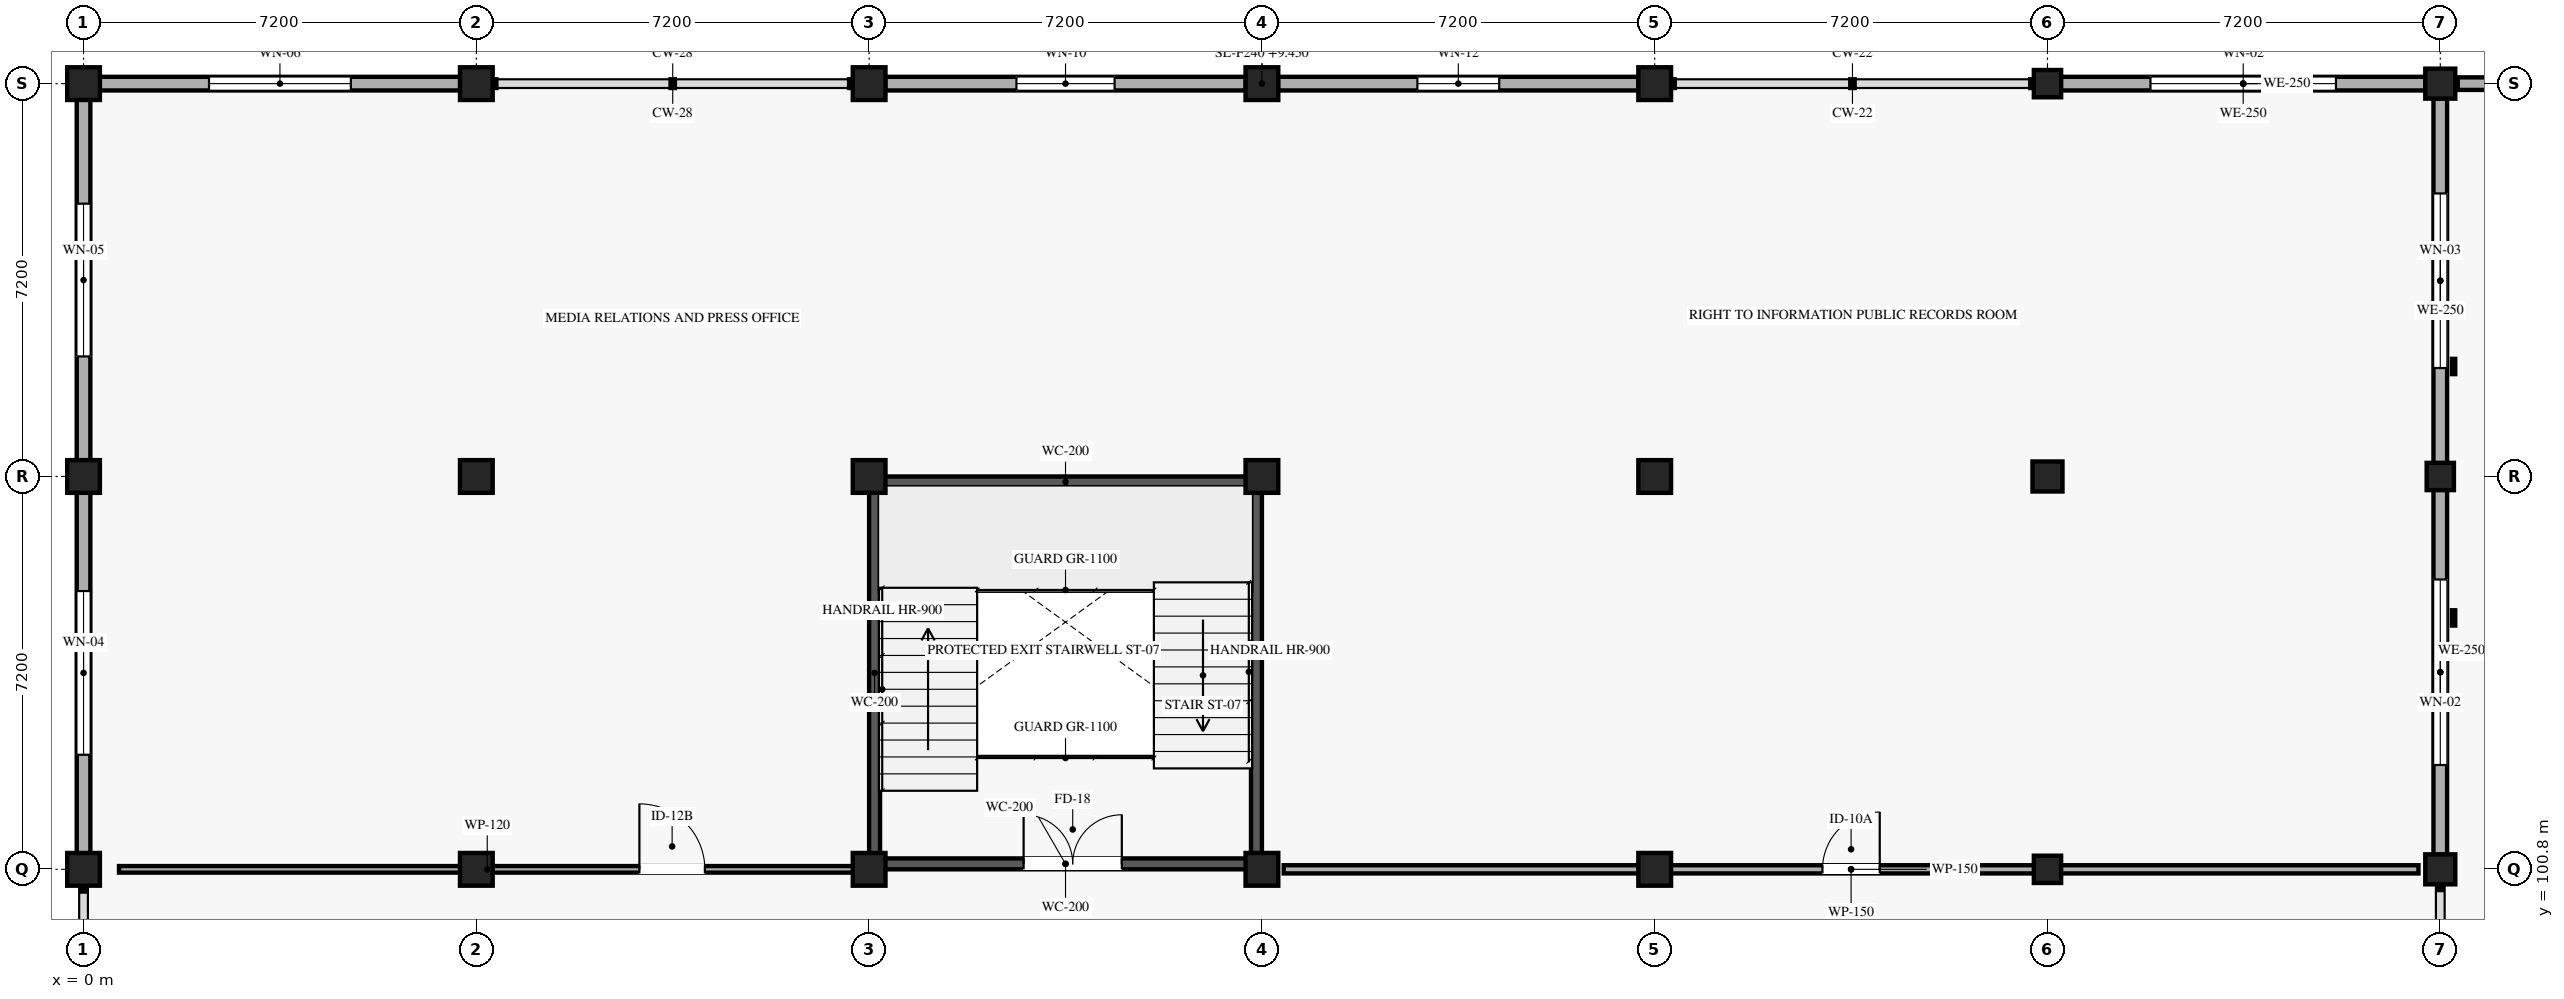
"""IFC4 building model, lengths in metres.
Left out: names, types, materials, properties, quantities, classifications, styles, units other than length and angle.
Written with IfcOpenShell. Run it as: python <this file> out.ifc"""

import sys

from ifc_helpers import new_model, si_unit, direction, frame, frame_2d, origin, origin_2d, place, context, subcontext, project, spatial, rectangle, extrude, element, fill, save


model = new_model("IFC4")
c1 = context("Model", 3, precision=1e-05, world=origin(), true_north=direction((0.0, 1.0)))
c2 = subcontext(c1, "Body", "Model", "MODEL_VIEW")
j1 = project(units=[si_unit("LENGTHUNIT", "METRE"), si_unit("PLANEANGLEUNIT", "RADIAN")], contexts=[c1])
p1 = place(None, origin())
s1 = spatial("IfcSite", under=j1, at=p1, CompositionType="ELEMENT")
p2 = place(p1, origin())
s2 = spatial("IfcBuilding", under=s1, at=p2, CompositionType="ELEMENT")
p3 = place(p2, frame((0.0, 0.0, 9.45)))
s3 = spatial("IfcBuildingStorey", under=s2, at=p3, CompositionType="ELEMENT", Elevation=9.45)
for number, where, z_axis, x_axis in (
    (1, (0.0, 100.8, 0.0), (0.0, 0.0, 1.0), (1.0, 0.0, 0.0)),
    (2, (0.0, 108.0, 0.0), (0.0, 0.0, 1.0), (1.0, 0.0, 0.0)),
    (3, (0.0, 115.2, 0.0), (0.0, 0.0, 1.0), (1.0, 0.0, 0.0)),
    (4, (7.2, 100.8, 0.0), (0.0, 0.0, 1.0), (1.0, 0.0, 0.0)),
    (5, (7.2, 108.0, 0.0), (0.0, 0.0, 1.0), (1.0, 0.0, 0.0)),
    (6, (7.2, 115.2, 0.0), (0.0, 0.0, 1.0), (1.0, 0.0, 0.0)),
    (7, (14.4, 100.8, 0.0), (0.0, 0.0, 1.0), (1.0, 0.0, 0.0)),
    (8, (14.4, 108.0, 0.0), (0.0, 0.0, 1.0), (1.0, 0.0, 0.0)),
    (9, (14.4, 115.2, 0.0), (0.0, 0.0, 1.0), (1.0, 0.0, 0.0)),
    (10, (21.6, 100.8, 0.0), (0.0, 0.0, 1.0), (1.0, 0.0, 0.0)),
    (11, (21.6, 108.0, 0.0), (0.0, 0.0, 1.0), (1.0, 0.0, 0.0)),
    (12, (21.6, 115.2, 0.0), (0.0, 0.0, 1.0), (1.0, 0.0, 0.0)),
    (13, (28.8, 100.8, 0.0), (0.0, 0.0, 1.0), (1.0, 0.0, 0.0)),
    (14, (28.8, 108.0, 0.0), (0.0, 0.0, 1.0), (1.0, 0.0, 0.0)),
    (15, (28.8, 115.2, 0.0), (0.0, 0.0, 1.0), (1.0, 0.0, 0.0)),
):
    element("IfcColumn", number, at=place(p3, frame(where, z_axis=z_axis, x_axis=x_axis)), inside=s3, PredefinedType="COLUMN", context=c2, shape_type="SweptSolid", body=[
        extrude(rectangle(XDim=0.6, YDim=0.6, at=origin_2d()), origin(), (0.0, 0.0, 1.0), 4.05),
    ])
p4 = place(p3, frame((36.0, 100.8, 0.0), z_axis=(0.0, 0.0, 1.0), x_axis=(1.0, 0.0, 0.0)))
e16 = element("IfcColumn", 16, at=p4, inside=s3, PredefinedType="COLUMN", context=c2, shape_type="SweptSolid", body=[
    extrude(rectangle(XDim=0.5, YDim=0.5, at=origin_2d()), origin(), (0.0, 0.0, 1.0), 4.05),
])
p5 = place(p3, frame((36.0, 108.0, 0.0), z_axis=(0.0, 0.0, 1.0), x_axis=(1.0, 0.0, 0.0)))
e17 = element("IfcColumn", 17, at=p5, inside=s3, PredefinedType="COLUMN", context=c2, shape_type="SweptSolid", body=[
    extrude(rectangle(XDim=0.55, YDim=0.55, at=origin_2d()), origin(), (0.0, 0.0, 1.0), 4.05),
])
p6 = place(p3, frame((36.0, 115.2, 0.0), z_axis=(0.0, 0.0, 1.0), x_axis=(1.0, 0.0, 0.0)))
e18 = element("IfcColumn", 18, at=p6, inside=s3, PredefinedType="COLUMN", context=c2, shape_type="SweptSolid", body=[
    extrude(rectangle(XDim=0.5, YDim=0.5, at=origin_2d()), origin(), (0.0, 0.0, 1.0), 4.05),
])
p7 = place(p3, frame((43.2, 100.8, 0.0), z_axis=(0.0, 0.0, 1.0), x_axis=(1.0, 0.0, 0.0)))
e19 = element("IfcColumn", 19, at=p7, inside=s3, PredefinedType="COLUMN", context=c2, shape_type="SweptSolid", body=[
    extrude(rectangle(XDim=0.55, YDim=0.55, at=origin_2d()), origin(), (0.0, 0.0, 1.0), 4.05),
])
p8 = place(p3, frame((43.2, 108.0, 0.0), z_axis=(0.0, 0.0, 1.0), x_axis=(1.0, 0.0, 0.0)))
e20 = element("IfcColumn", 20, at=p8, inside=s3, PredefinedType="COLUMN", context=c2, shape_type="SweptSolid", body=[
    extrude(rectangle(XDim=0.5, YDim=0.5, at=origin_2d()), origin(), (0.0, 0.0, 1.0), 4.05),
])
p9 = place(p3, frame((43.2, 115.2, 0.0), z_axis=(0.0, 0.0, 1.0), x_axis=(1.0, 0.0, 0.0)))
e21 = element("IfcColumn", 21, at=p9, inside=s3, PredefinedType="COLUMN", context=c2, shape_type="SweptSolid", body=[
    extrude(rectangle(XDim=0.55, YDim=0.55, at=origin_2d()), origin(), (0.0, 0.0, 1.0), 4.05),
])
p10 = place(p3, frame((0.295, 115.2, 0.0), z_axis=(0.0, 0.0, 1.0), x_axis=(1.0, 0.0, 0.0)))
e22 = element("IfcWall", 22, at=p10, inside=s3, PredefinedType="SOLIDWALL", context=c2, shape_type="SweptSolid", body=[
    extrude(rectangle(XDim=6.61, YDim=0.25, at=frame_2d((3.305, 0.0))), origin(), (0.0, 0.0, 1.0), 3.195),
])
p11 = place(p10, frame((2.005, 0.0, 0.85)))
e23 = element("IfcOpeningElement", 23, at=p11, cuts=e22, PredefinedType="OPENING", context=c2, shape_type="SweptSolid", body=[
    extrude(rectangle(XDim=2.6, YDim=1.8, at=frame_2d((1.3, 0.9))), frame((0.0, 0.135, 0.0), z_axis=(0.0, -1.0, 0.0), x_axis=(1.0, 0.0, 0.0)), (0.0, 0.0, 1.0), 0.27),
])
p12 = place(p3, frame((14.695, 115.2, 0.0), z_axis=(0.0, 0.0, 1.0), x_axis=(1.0, 0.0, 0.0)))
e24 = element("IfcWall", 24, at=p12, inside=s3, PredefinedType="SOLIDWALL", context=c2, shape_type="SweptSolid", body=[
    extrude(rectangle(XDim=6.61, YDim=0.25, at=frame_2d((3.305, 0.0))), origin(), (0.0, 0.0, 1.0), 3.195),
])
p13 = place(p12, frame((2.405, 0.0, 0.85)))
e25 = element("IfcOpeningElement", 25, at=p13, cuts=e24, PredefinedType="OPENING", context=c2, shape_type="SweptSolid", body=[
    extrude(rectangle(XDim=1.8, YDim=1.6, at=frame_2d((0.9, 0.8))), frame((0.0, 0.135, 0.0), z_axis=(0.0, -1.0, 0.0), x_axis=(1.0, 0.0, 0.0)), (0.0, 0.0, 1.0), 0.27),
])
p14 = place(p3, frame((21.895, 115.2, 0.0), z_axis=(0.0, 0.0, 1.0), x_axis=(1.0, 0.0, 0.0)))
e26 = element("IfcWall", 26, at=p14, inside=s3, PredefinedType="SOLIDWALL", context=c2, shape_type="SweptSolid", body=[
    extrude(rectangle(XDim=6.61, YDim=0.25, at=frame_2d((3.305, 0.0))), origin(), (0.0, 0.0, 1.0), 3.195),
])
p15 = place(p14, frame((2.555, 0.0, 0.85)))
e27 = element("IfcOpeningElement", 27, at=p15, cuts=e26, PredefinedType="OPENING", context=c2, shape_type="SweptSolid", body=[
    extrude(rectangle(XDim=1.5, YDim=2.05, at=frame_2d((0.75, 1.025))), frame((0.0, 0.135, 0.0), z_axis=(0.0, -1.0, 0.0), x_axis=(1.0, 0.0, 0.0)), (0.0, 0.0, 1.0), 0.27),
])
p16 = place(p3, frame((36.245, 115.2, 0.0), z_axis=(0.0, 0.0, 1.0), x_axis=(1.0, 0.0, 0.0)))
e28 = element("IfcWall", 28, at=p16, inside=s3, PredefinedType="SOLIDWALL", context=c2, shape_type="SweptSolid", body=[
    extrude(rectangle(XDim=6.685, YDim=0.25, at=frame_2d((3.342, 0.0))), origin(), (0.0, 0.0, 1.0), 3.195),
])
p17 = place(p16, frame((1.643, 0.0, 0.85)))
e29 = element("IfcOpeningElement", 29, at=p17, cuts=e28, PredefinedType="OPENING", context=c2, shape_type="SweptSolid", body=[
    extrude(rectangle(XDim=3.4, YDim=2.0, at=frame_2d((1.7, 1.0))), frame((0.0, 0.135, 0.0), z_axis=(0.0, -1.0, 0.0), x_axis=(1.0, 0.0, 0.0)), (0.0, 0.0, 1.0), 0.27),
])
p18 = place(p3, frame((0.0, 101.095, 0.0), z_axis=(0.0, 0.0, 1.0), x_axis=(0.0, 1.0, 0.0)))
e30 = element("IfcWall", 30, at=p18, inside=s3, PredefinedType="SOLIDWALL", context=c2, shape_type="SweptSolid", body=[
    extrude(rectangle(XDim=6.61, YDim=0.25, at=frame_2d((3.305, 0.0))), origin(), (0.0, 0.0, 1.0), 3.195),
])
p19 = place(p18, frame((1.805, 0.0, 0.85)))
e31 = element("IfcOpeningElement", 31, at=p19, cuts=e30, PredefinedType="OPENING", context=c2, shape_type="SweptSolid", body=[
    extrude(rectangle(XDim=3.0, YDim=1.9, at=frame_2d((1.5, 0.95))), frame((0.0, 0.135, 0.0), z_axis=(0.0, -1.0, 0.0), x_axis=(1.0, 0.0, 0.0)), (0.0, 0.0, 1.0), 0.27),
])
p20 = place(p3, frame((0.0, 108.295, 0.0), z_axis=(0.0, 0.0, 1.0), x_axis=(0.0, 1.0, 0.0)))
e32 = element("IfcWall", 32, at=p20, inside=s3, PredefinedType="SOLIDWALL", context=c2, shape_type="SweptSolid", body=[
    extrude(rectangle(XDim=6.61, YDim=0.25, at=frame_2d((3.305, 0.0))), origin(), (0.0, 0.0, 1.0), 3.195),
])
p21 = place(p20, frame((1.905, 0.0, 0.85)))
e33 = element("IfcOpeningElement", 33, at=p21, cuts=e32, PredefinedType="OPENING", context=c2, shape_type="SweptSolid", body=[
    extrude(rectangle(XDim=2.8, YDim=1.85, at=frame_2d((1.4, 0.925))), frame((0.0, 0.135, 0.0), z_axis=(0.0, -1.0, 0.0), x_axis=(1.0, 0.0, 0.0)), (0.0, 0.0, 1.0), 0.27),
])
p22 = place(p3, frame((43.2, 101.07, 0.0), z_axis=(0.0, 0.0, 1.0), x_axis=(0.0, 1.0, 0.0)))
e34 = element("IfcWall", 34, at=p22, inside=s3, PredefinedType="SOLIDWALL", context=c2, shape_type="SweptSolid", body=[
    extrude(rectangle(XDim=6.685, YDim=0.25, at=frame_2d((3.342, 0.0))), origin(), (0.0, 0.0, 1.0), 3.195),
])
p23 = place(p22, frame((1.643, 0.0, 0.85)))
e35 = element("IfcOpeningElement", 35, at=p23, cuts=e34, PredefinedType="OPENING", context=c2, shape_type="SweptSolid", body=[
    extrude(rectangle(XDim=3.4, YDim=2.0, at=frame_2d((1.7, 1.0))), frame((0.0, 0.135, 0.0), z_axis=(0.0, -1.0, 0.0), x_axis=(1.0, 0.0, 0.0)), (0.0, 0.0, 1.0), 0.27),
])
p24 = place(p3, frame((43.2, 108.245, 0.0), z_axis=(0.0, 0.0, 1.0), x_axis=(0.0, 1.0, 0.0)))
e36 = element("IfcWall", 36, at=p24, inside=s3, PredefinedType="SOLIDWALL", context=c2, shape_type="SweptSolid", body=[
    extrude(rectangle(XDim=6.685, YDim=0.25, at=frame_2d((3.342, 0.0))), origin(), (0.0, 0.0, 1.0), 3.195),
])
p25 = place(p24, frame((1.742, 0.0, 0.85)))
e37 = element("IfcOpeningElement", 37, at=p25, cuts=e36, PredefinedType="OPENING", context=c2, shape_type="SweptSolid", body=[
    extrude(rectangle(XDim=3.2, YDim=1.95, at=frame_2d((1.6, 0.975))), frame((0.0, 0.135, 0.0), z_axis=(0.0, -1.0, 0.0), x_axis=(1.0, 0.0, 0.0)), (0.0, 0.0, 1.0), 0.27),
])
p26 = place(p3, frame((43.52, 115.2, -0.24), z_axis=(0.0, 0.0, 1.0), x_axis=(1.0, 0.0, 0.0)))
e38 = element("IfcWall", 38, at=p26, inside=s3, PredefinedType="SOLIDWALL", context=c2, shape_type="SweptSolid", body=[
    extrude(rectangle(XDim=6.56, YDim=0.23, at=frame_2d((3.28, 0.0))), origin(), (0.0, 0.0, 1.0), 8.79),
])
p27 = place(p26, frame((1.18, 0.0, 0.85)))
e39 = element("IfcOpeningElement", 39, at=p27, cuts=e38, PredefinedType="OPENING", context=c2, shape_type="SweptSolid", body=[
    extrude(rectangle(XDim=4.2, YDim=1.75, at=frame_2d((2.1, 0.875))), frame((0.0, 0.125, 0.0), z_axis=(0.0, -1.0, 0.0), x_axis=(1.0, 0.0, 0.0)), (0.0, 0.0, 1.0), 0.25),
])
p28 = place(p3, frame((14.6, 100.9, 0.0), z_axis=(0.0, 0.0, 1.0), x_axis=(1.0, 0.0, 0.0)))
e40 = element("IfcWall", 40, at=p28, inside=s3, PredefinedType="SHEAR", context=c2, shape_type="SweptSolid", body=[
    extrude(rectangle(XDim=6.8, YDim=0.2, at=frame_2d((3.4, 0.0))), origin(), (0.0, 0.0, 1.0), 3.81),
])
p29 = place(p28, frame((2.632, 0.0, 0.0)))
e41 = element("IfcOpeningElement", 41, at=p29, cuts=e40, PredefinedType="OPENING", context=c2, shape_type="SweptSolid", body=[
    extrude(rectangle(XDim=1.8, YDim=2.2, at=frame_2d((0.9, 1.1))), frame((0.0, 0.11, 0.0), z_axis=(0.0, -1.0, 0.0), x_axis=(1.0, 0.0, 0.0)), (0.0, 0.0, 1.0), 0.22),
])
p30 = place(p3, frame((14.6, 107.9, 0.0), z_axis=(0.0, 0.0, 1.0), x_axis=(1.0, 0.0, 0.0)))
e42 = element("IfcWall", 42, at=p30, inside=s3, PredefinedType="SHEAR", context=c2, shape_type="SweptSolid", body=[
    extrude(rectangle(XDim=6.8, YDim=0.2, at=frame_2d((3.4, 0.0))), origin(), (0.0, 0.0, 1.0), 3.81),
])
for number, where, z_axis, x_axis in (
    (43, (14.5, 101.0, 0.0), (0.0, 0.0, 1.0), (0.0, 1.0, 0.0)),
    (44, (21.5, 101.0, 0.0), (0.0, 0.0, 1.0), (0.0, 1.0, 0.0)),
):
    element("IfcWall", number, at=place(p3, frame(where, z_axis=z_axis, x_axis=x_axis)), inside=s3, PredefinedType="SHEAR", context=c2, shape_type="SweptSolid", body=[
        extrude(rectangle(XDim=6.8, YDim=0.2, at=frame_2d((3.4, 0.0))), origin(), (0.0, 0.0, 1.0), 3.81),
    ])
p31 = place(p3, frame((0.65, 100.8, 0.0), z_axis=(0.0, 0.0, 1.0), x_axis=(1.0, 0.0, 0.0)))
e45 = element("IfcWall", 45, at=p31, inside=s3, PredefinedType="PARTITIONING", context=c2, shape_type="SweptSolid", body=[
    extrude(rectangle(XDim=13.5, YDim=0.12, at=frame_2d((6.75, 0.0))), origin(), (0.0, 0.0, 1.0), 3.2),
])
p32 = place(p31, frame((9.539, 0.0, 0.0)))
e46 = element("IfcOpeningElement", 46, at=p32, cuts=e45, PredefinedType="OPENING", context=c2, shape_type="SweptSolid", body=[
    extrude(rectangle(XDim=1.2, YDim=2.15, at=frame_2d((0.6, 1.075))), frame((0.0, 0.07, 0.0), z_axis=(0.0, -1.0, 0.0), x_axis=(1.0, 0.0, 0.0)), (0.0, 0.0, 1.0), 0.14),
])
p33 = place(p3, frame((22.0, 100.8, 0.0), z_axis=(0.0, 0.0, 1.0), x_axis=(1.0, 0.0, 0.0)))
e47 = element("IfcWall", 47, at=p33, inside=s3, PredefinedType="PARTITIONING", context=c2, shape_type="SweptSolid", body=[
    extrude(rectangle(XDim=20.8, YDim=0.15, at=frame_2d((10.4, 0.0))), origin(), (0.0, 0.0, 1.0), 3.2),
])
p34 = place(p33, frame((9.875, 0.0, 0.0)))
e48 = element("IfcOpeningElement", 48, at=p34, cuts=e47, PredefinedType="OPENING", context=c2, shape_type="SweptSolid", body=[
    extrude(rectangle(XDim=1.05, YDim=2.15, at=frame_2d((0.525, 1.075))), frame((0.0, 0.085, 0.0), z_axis=(0.0, -1.0, 0.0), x_axis=(1.0, 0.0, 0.0)), (0.0, 0.0, 1.0), 0.17),
])
p35 = place(p11, origin())
e49 = element("IfcWindow", 49, at=p35, inside=s3, PartitioningType="SINGLE_PANEL", PredefinedType="WINDOW", context=c2, shape_type="SweptSolid", body=[
    extrude(rectangle(XDim=2.6, YDim=1.8, at=frame_2d((1.3, 0.9))), frame((0.0, 0.03, 0.0), z_axis=(0.0, -1.0, 0.0), x_axis=(1.0, 0.0, 0.0)), (0.0, 0.0, 1.0), 0.06),
])
fill(e23, e49)
p36 = place(p13, origin())
e50 = element("IfcWindow", 50, at=p36, inside=s3, PartitioningType="SINGLE_PANEL", PredefinedType="WINDOW", context=c2, shape_type="SweptSolid", body=[
    extrude(rectangle(XDim=1.8, YDim=1.6, at=frame_2d((0.9, 0.8))), frame((0.0, 0.03, 0.0), z_axis=(0.0, -1.0, 0.0), x_axis=(1.0, 0.0, 0.0)), (0.0, 0.0, 1.0), 0.06),
])
fill(e25, e50)
p37 = place(p15, origin())
e51 = element("IfcWindow", 51, at=p37, inside=s3, PartitioningType="SINGLE_PANEL", PredefinedType="WINDOW", context=c2, shape_type="SweptSolid", body=[
    extrude(rectangle(XDim=1.5, YDim=2.05, at=frame_2d((0.75, 1.025))), frame((0.0, 0.03, 0.0), z_axis=(0.0, -1.0, 0.0), x_axis=(1.0, 0.0, 0.0)), (0.0, 0.0, 1.0), 0.06),
])
fill(e27, e51)
p38 = place(p17, origin())
e52 = element("IfcWindow", 52, at=p38, inside=s3, PartitioningType="SINGLE_PANEL", PredefinedType="WINDOW", context=c2, shape_type="SweptSolid", body=[
    extrude(rectangle(XDim=3.4, YDim=2.0, at=frame_2d((1.7, 1.0))), frame((0.0, 0.03, 0.0), z_axis=(0.0, -1.0, 0.0), x_axis=(1.0, 0.0, 0.0)), (0.0, 0.0, 1.0), 0.06),
])
fill(e29, e52)
p39 = place(p19, origin())
e53 = element("IfcWindow", 53, at=p39, inside=s3, PartitioningType="SINGLE_PANEL", PredefinedType="WINDOW", context=c2, shape_type="SweptSolid", body=[
    extrude(rectangle(XDim=3.0, YDim=1.9, at=frame_2d((1.5, 0.95))), frame((0.0, 0.03, 0.0), z_axis=(0.0, -1.0, 0.0), x_axis=(1.0, 0.0, 0.0)), (0.0, 0.0, 1.0), 0.06),
])
fill(e31, e53)
p40 = place(p21, origin())
e54 = element("IfcWindow", 54, at=p40, inside=s3, PartitioningType="SINGLE_PANEL", PredefinedType="WINDOW", context=c2, shape_type="SweptSolid", body=[
    extrude(rectangle(XDim=2.8, YDim=1.85, at=frame_2d((1.4, 0.925))), frame((0.0, 0.03, 0.0), z_axis=(0.0, -1.0, 0.0), x_axis=(1.0, 0.0, 0.0)), (0.0, 0.0, 1.0), 0.06),
])
fill(e33, e54)
p41 = place(p23, origin())
e55 = element("IfcWindow", 55, at=p41, inside=s3, PartitioningType="SINGLE_PANEL", PredefinedType="WINDOW", context=c2, shape_type="SweptSolid", body=[
    extrude(rectangle(XDim=3.4, YDim=2.0, at=frame_2d((1.7, 1.0))), frame((0.0, 0.03, 0.0), z_axis=(0.0, -1.0, 0.0), x_axis=(1.0, 0.0, 0.0)), (0.0, 0.0, 1.0), 0.06),
])
fill(e35, e55)
p42 = place(p25, origin())
e56 = element("IfcWindow", 56, at=p42, inside=s3, PartitioningType="SINGLE_PANEL", PredefinedType="WINDOW", context=c2, shape_type="SweptSolid", body=[
    extrude(rectangle(XDim=3.2, YDim=1.95, at=frame_2d((1.6, 0.975))), frame((0.0, 0.03, 0.0), z_axis=(0.0, -1.0, 0.0), x_axis=(1.0, 0.0, 0.0)), (0.0, 0.0, 1.0), 0.06),
])
fill(e37, e56)
p43 = place(p29, origin())
e57 = element("IfcDoor", 57, at=p43, inside=s3, OperationType="DOUBLE_DOOR_SINGLE_SWING", PredefinedType="DOOR", context=c2, shape_type="SweptSolid", body=[
    extrude(rectangle(XDim=1.8, YDim=2.2, at=frame_2d((0.9, 1.1))), frame((0.0, 0.025, 0.0), z_axis=(0.0, -1.0, 0.0), x_axis=(1.0, 0.0, 0.0)), (0.0, 0.0, 1.0), 0.05),
])
fill(e41, e57)
p44 = place(p32, origin())
e58 = element("IfcDoor", 58, at=p44, inside=s3, OperationType="SINGLE_SWING_LEFT", PredefinedType="DOOR", context=c2, shape_type="SweptSolid", body=[
    extrude(rectangle(XDim=1.2, YDim=2.15, at=frame_2d((0.6, 1.075))), frame((0.0, 0.025, 0.0), z_axis=(0.0, -1.0, 0.0), x_axis=(1.0, 0.0, 0.0)), (0.0, 0.0, 1.0), 0.05),
])
fill(e46, e58)
p45 = place(p34, origin())
e59 = element("IfcDoor", 59, at=p45, inside=s3, OperationType="SINGLE_SWING_RIGHT", PredefinedType="DOOR", context=c2, shape_type="SweptSolid", body=[
    extrude(rectangle(XDim=1.05, YDim=2.15, at=frame_2d((0.525, 1.075))), frame((0.0, 0.025, 0.0), z_axis=(0.0, -1.0, 0.0), x_axis=(1.0, 0.0, 0.0)), (0.0, 0.0, 1.0), 0.05),
])
fill(e48, e59)
save(model, sys.argv[1])
